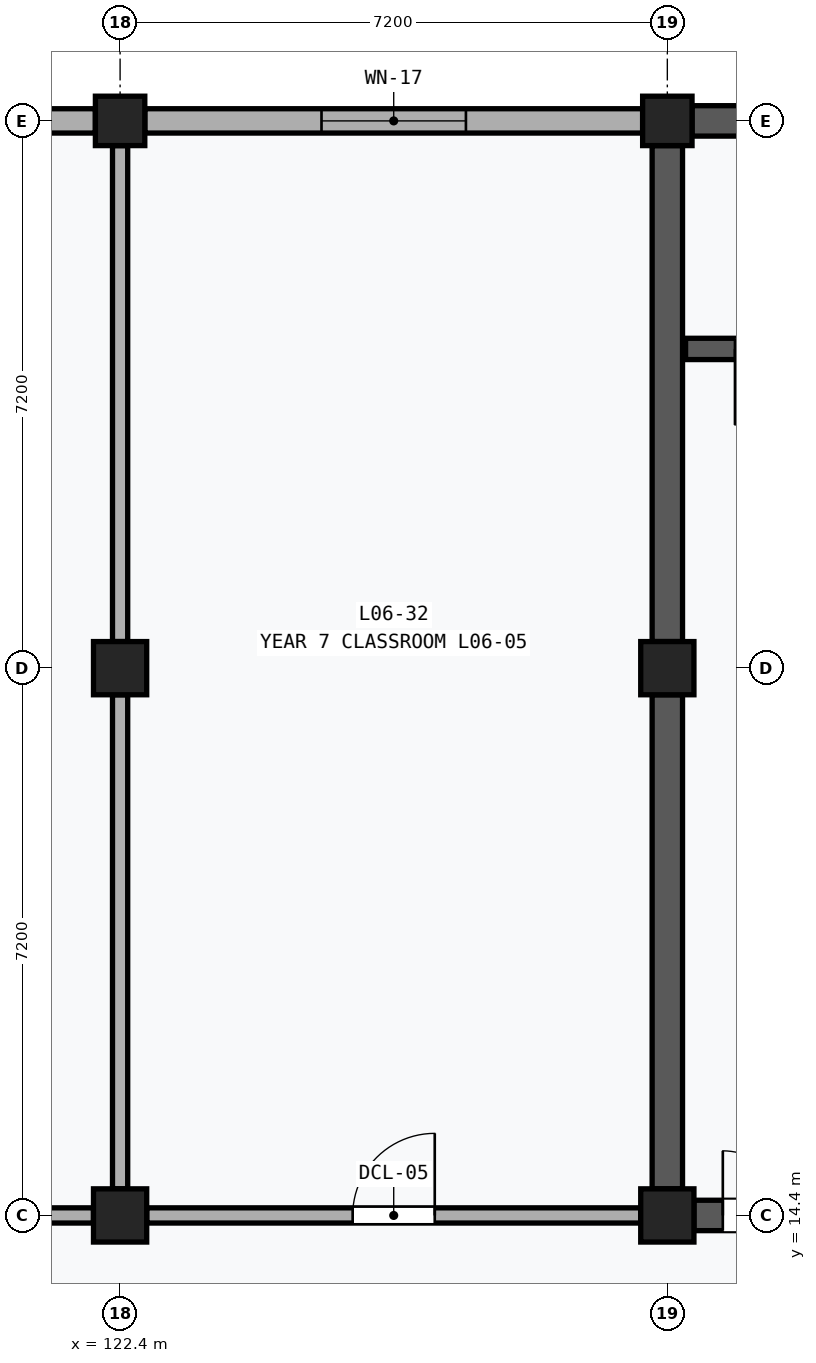
"""IFC4 building model, lengths in metres.
Left out: names, types, materials, properties, quantities, classifications, styles, units other than length and angle.
Written with IfcOpenShell. Run it as: python <this file> out.ifc"""

import sys

from ifc_helpers import new_model, si_unit, direction, frame, frame_2d, origin, origin_2d, place, context, subcontext, project, spatial, rectangle, extrude, element, fill, save


model = new_model("IFC4")
c1 = context("Model", 3, precision=1e-05, world=origin(), true_north=direction((0.0, 1.0)))
c2 = subcontext(c1, "Body", "Model", "MODEL_VIEW")
j1 = project(units=[si_unit("LENGTHUNIT", "METRE"), si_unit("PLANEANGLEUNIT", "RADIAN")], contexts=[c1])
p1 = place(None, origin())
s1 = spatial("IfcSite", under=j1, at=p1, CompositionType="ELEMENT")
p2 = place(p1, origin())
s2 = spatial("IfcBuilding", under=s1, at=p2, CompositionType="ELEMENT")
p3 = place(p2, frame((0.0, 0.0, 26.6)))
s3 = spatial("IfcBuildingStorey", under=s2, at=p3, CompositionType="ELEMENT", Elevation=26.6)
for number, where, z_axis, x_axis in (
    (1, (122.4, 14.4, 0.0), (0.0, 0.0, 1.0), (1.0, 0.0, 0.0)),
    (2, (122.4, 21.6, 0.0), (0.0, 0.0, 1.0), (1.0, 0.0, 0.0)),
):
    element("IfcColumn", number, at=place(p3, frame(where, z_axis=z_axis, x_axis=x_axis)), inside=s3, PredefinedType="COLUMN", context=c2, shape_type="SweptSolid", body=[
        extrude(rectangle(XDim=0.7, YDim=0.7, at=origin_2d()), origin(), (0.0, 0.0, 1.0), 4.0),
    ])
p4 = place(p3, frame((122.4, 28.8, 0.0), z_axis=(0.0, 0.0, 1.0), x_axis=(1.0, 0.0, 0.0)))
e3 = element("IfcColumn", 3, at=p4, inside=s3, PredefinedType="COLUMN", context=c2, shape_type="SweptSolid", body=[
    extrude(rectangle(XDim=0.65, YDim=0.65, at=origin_2d()), origin(), (0.0, 0.0, 1.0), 4.0),
])
for number, where, z_axis, x_axis in (
    (4, (129.6, 14.4, 0.0), (0.0, 0.0, 1.0), (1.0, 0.0, 0.0)),
    (5, (129.6, 21.6, 0.0), (0.0, 0.0, 1.0), (1.0, 0.0, 0.0)),
):
    element("IfcColumn", number, at=place(p3, frame(where, z_axis=z_axis, x_axis=x_axis)), inside=s3, PredefinedType="COLUMN", context=c2, shape_type="SweptSolid", body=[
        extrude(rectangle(XDim=0.7, YDim=0.7, at=origin_2d()), origin(), (0.0, 0.0, 1.0), 4.0),
    ])
p5 = place(p3, frame((129.6, 28.8, 0.0), z_axis=(0.0, 0.0, 1.0), x_axis=(1.0, 0.0, 0.0)))
e6 = element("IfcColumn", 6, at=p5, inside=s3, PredefinedType="COLUMN", context=c2, shape_type="SweptSolid", body=[
    extrude(rectangle(XDim=0.65, YDim=0.65, at=origin_2d()), origin(), (0.0, 0.0, 1.0), 4.0),
])
p6 = place(p3, frame((115.45, 28.8, 0.0), z_axis=(0.0, 0.0, 1.0), x_axis=(1.0, 0.0, 0.0)))
e7 = element("IfcWall", 7, at=p6, inside=s3, PredefinedType="SOLIDWALL", context=c2, shape_type="SweptSolid", body=[
    extrude(rectangle(XDim=6.625, YDim=0.32, at=frame_2d((3.312, 0.0))), origin(), (0.0, 0.0, 1.0), 3.1),
])
p7 = place(p6, frame((2.512, 0.0, 1.1)))
e8 = element("IfcOpeningElement", 8, at=p7, cuts=e7, PredefinedType="OPENING", context=c2, shape_type="SweptSolid", body=[
    extrude(rectangle(XDim=1.6, YDim=1.5, at=frame_2d((0.8, 0.75))), frame((0.0, 0.172, 0.0), z_axis=(0.0, -1.0, 0.0), x_axis=(1.0, 0.0, 0.0)), (0.0, 0.0, 1.0), 0.344),
])
p8 = place(p3, frame((122.725, 28.8, 0.0), z_axis=(0.0, 0.0, 1.0), x_axis=(1.0, 0.0, 0.0)))
e9 = element("IfcWall", 9, at=p8, inside=s3, PredefinedType="SOLIDWALL", context=c2, shape_type="SweptSolid", body=[
    extrude(rectangle(XDim=6.55, YDim=0.32, at=frame_2d((3.275, 0.0))), origin(), (0.0, 0.0, 1.0), 3.1),
])
p9 = place(p8, frame((2.325, 0.0, 1.1)))
e10 = element("IfcOpeningElement", 10, at=p9, cuts=e9, PredefinedType="OPENING", context=c2, shape_type="SweptSolid", body=[
    extrude(rectangle(XDim=1.9, YDim=1.5, at=frame_2d((0.95, 0.75))), frame((0.0, 0.172, 0.0), z_axis=(0.0, -1.0, 0.0), x_axis=(1.0, 0.0, 0.0)), (0.0, 0.0, 1.0), 0.344),
])
p10 = place(p3, frame((129.6, 14.75, 0.0), z_axis=(0.0, 0.0, 1.0), x_axis=(0.0, 1.0, 0.0)))
e11 = element("IfcWall", 11, at=p10, inside=s3, PredefinedType="SHEAR", context=c2, shape_type="SweptSolid", body=[
    extrude(rectangle(XDim=6.5, YDim=0.4, at=frame_2d((3.25, 0.0))), origin(), (0.0, 0.0, 1.0), 2.96),
])
p11 = place(p3, frame((129.6, 21.95, 0.0), z_axis=(0.0, 0.0, 1.0), x_axis=(0.0, 1.0, 0.0)))
e12 = element("IfcWall", 12, at=p11, inside=s3, PredefinedType="SHEAR", context=c2, shape_type="SweptSolid", body=[
    extrude(rectangle(XDim=6.525, YDim=0.4, at=frame_2d((3.263, 0.0))), origin(), (0.0, 0.0, 1.0), 2.96),
])
p12 = place(p3, frame((129.95, 14.4, 0.0), z_axis=(0.0, 0.0, 1.0), x_axis=(1.0, 0.0, 0.0)))
e13 = element("IfcWall", 13, at=p12, inside=s3, PredefinedType="SHEAR", context=c2, shape_type="SweptSolid", body=[
    extrude(rectangle(XDim=6.5, YDim=0.4, at=frame_2d((3.25, 0.0))), origin(), (0.0, 0.0, 1.0), 3.03),
])
p13 = place(p12, frame((0.38, 0.0, 0.0)))
e14 = element("IfcOpeningElement", 14, at=p13, cuts=e13, PredefinedType="OPENING", context=c2, shape_type="SweptSolid", body=[
    extrude(rectangle(XDim=1.7, YDim=2.25, at=frame_2d((0.85, 1.125))), frame((0.0, 0.212, 0.0), z_axis=(0.0, -1.0, 0.0), x_axis=(1.0, 0.0, 0.0)), (0.0, 0.0, 1.0), 0.424),
])
p14 = place(p3, frame((129.925, 28.8, 0.0), z_axis=(0.0, 0.0, 1.0), x_axis=(1.0, 0.0, 0.0)))
e15 = element("IfcWall", 15, at=p14, inside=s3, PredefinedType="SHEAR", context=c2, shape_type="SweptSolid", body=[
    extrude(rectangle(XDim=6.55, YDim=0.4, at=frame_2d((3.275, 0.0))), origin(), (0.0, 0.0, 1.0), 3.1),
])
p15 = place(p3, frame((129.84, 25.8, 0.0), z_axis=(0.0, 0.0, 1.0), x_axis=(1.0, 0.0, 0.0)))
e16 = element("IfcWall", 16, at=p15, inside=s3, PredefinedType="SHEAR", context=c2, shape_type="SweptSolid", body=[
    extrude(rectangle(XDim=2.68, YDim=0.28, at=frame_2d((1.34, 0.0))), origin(), (0.0, 0.0, 1.0), 3.73),
])
p16 = place(p15, frame((0.65, 0.0, 0.0)))
e17 = element("IfcOpeningElement", 17, at=p16, cuts=e16, PredefinedType="OPENING", context=c2, shape_type="SweptSolid", body=[
    extrude(rectangle(XDim=1.0, YDim=2.15, at=frame_2d((0.5, 1.075))), frame((0.0, 0.152, 0.0), z_axis=(0.0, -1.0, 0.0), x_axis=(1.0, 0.0, 0.0)), (0.0, 0.0, 1.0), 0.304),
])
p17 = place(p3, frame((115.55, 14.4, 0.0), z_axis=(0.0, 0.0, 1.0), x_axis=(1.0, 0.0, 0.0)))
e18 = element("IfcWall", 18, at=p17, inside=s3, PredefinedType="PARTITIONING", context=c2, shape_type="SweptSolid", body=[
    extrude(rectangle(XDim=6.5, YDim=0.2, at=frame_2d((3.25, 0.0))), origin(), (0.0, 0.0, 1.0), 2.96),
])
p18 = place(p17, frame((2.72, 0.0, 0.0)))
e19 = element("IfcOpeningElement", 19, at=p18, cuts=e18, PredefinedType="OPENING", context=c2, shape_type="SweptSolid", body=[
    extrude(rectangle(XDim=1.06, YDim=2.16, at=frame_2d((0.53, 1.08))), frame((0.0, 0.112, 0.0), z_axis=(0.0, -1.0, 0.0), x_axis=(1.0, 0.0, 0.0)), (0.0, 0.0, 1.0), 0.224),
])
p19 = place(p3, frame((122.4, 14.75, 0.0), z_axis=(0.0, 0.0, 1.0), x_axis=(0.0, 1.0, 0.0)))
e20 = element("IfcWall", 20, at=p19, inside=s3, PredefinedType="PARTITIONING", context=c2, shape_type="SweptSolid", body=[
    extrude(rectangle(XDim=6.5, YDim=0.2, at=frame_2d((3.25, 0.0))), origin(), (0.0, 0.0, 1.0), 2.96),
])
p20 = place(p3, frame((122.4, 21.95, 0.0), z_axis=(0.0, 0.0, 1.0), x_axis=(0.0, 1.0, 0.0)))
e21 = element("IfcWall", 21, at=p20, inside=s3, PredefinedType="PARTITIONING", context=c2, shape_type="SweptSolid", body=[
    extrude(rectangle(XDim=6.525, YDim=0.2, at=frame_2d((3.263, 0.0))), origin(), (0.0, 0.0, 1.0), 2.96),
])
p21 = place(p3, frame((122.75, 14.4, 0.0), z_axis=(0.0, 0.0, 1.0), x_axis=(1.0, 0.0, 0.0)))
e22 = element("IfcWall", 22, at=p21, inside=s3, PredefinedType="PARTITIONING", context=c2, shape_type="SweptSolid", body=[
    extrude(rectangle(XDim=6.5, YDim=0.2, at=frame_2d((3.25, 0.0))), origin(), (0.0, 0.0, 1.0), 2.96),
])
p22 = place(p21, frame((2.71, 0.0, 0.0)))
e23 = element("IfcOpeningElement", 23, at=p22, cuts=e22, PredefinedType="OPENING", context=c2, shape_type="SweptSolid", body=[
    extrude(rectangle(XDim=1.08, YDim=2.18, at=frame_2d((0.54, 1.09))), frame((0.0, 0.112, 0.0), z_axis=(0.0, -1.0, 0.0), x_axis=(1.0, 0.0, 0.0)), (0.0, 0.0, 1.0), 0.224),
])
p23 = place(p9, origin())
e24 = element("IfcWindow", 24, at=p23, inside=s3, PartitioningType="SINGLE_PANEL", PredefinedType="WINDOW", context=c2, shape_type="SweptSolid", body=[
    extrude(rectangle(XDim=1.9, YDim=1.5, at=frame_2d((0.95, 0.75))), frame((0.0, 0.03, 0.0), z_axis=(0.0, -1.0, 0.0), x_axis=(1.0, 0.0, 0.0)), (0.0, 0.0, 1.0), 0.06),
])
fill(e10, e24)
p24 = place(p13, origin())
e25 = element("IfcDoor", 25, at=p24, inside=s3, OperationType="DOUBLE_DOOR_SINGLE_SWING", PredefinedType="DOOR", context=c2, shape_type="SweptSolid", body=[
    extrude(rectangle(XDim=1.7, YDim=2.25, at=frame_2d((0.85, 1.125))), frame((0.0, 0.025, 0.0), z_axis=(0.0, -1.0, 0.0), x_axis=(1.0, 0.0, 0.0)), (0.0, 0.0, 1.0), 0.05),
])
fill(e14, e25)
p25 = place(p16, frame((1.0, 0.0, 0.0), z_axis=(0.0, 0.0, 1.0), x_axis=(-1.0, 0.0, 0.0)))
e26 = element("IfcDoor", 26, at=p25, inside=s3, OperationType="SINGLE_SWING_RIGHT", PredefinedType="DOOR", context=c2, shape_type="SweptSolid", body=[
    extrude(rectangle(XDim=1.0, YDim=2.15, at=frame_2d((0.5, 1.075))), frame((0.0, 0.025, 0.0), z_axis=(0.0, -1.0, 0.0), x_axis=(1.0, 0.0, 0.0)), (0.0, 0.0, 1.0), 0.05),
])
fill(e17, e26)
p26 = place(p22, origin())
e27 = element("IfcDoor", 27, at=p26, inside=s3, OperationType="SINGLE_SWING_RIGHT", PredefinedType="DOOR", context=c2, shape_type="SweptSolid", body=[
    extrude(rectangle(XDim=1.08, YDim=2.18, at=frame_2d((0.54, 1.09))), frame((0.0, 0.025, 0.0), z_axis=(0.0, -1.0, 0.0), x_axis=(1.0, 0.0, 0.0)), (0.0, 0.0, 1.0), 0.05),
])
fill(e23, e27)
save(model, sys.argv[1])
